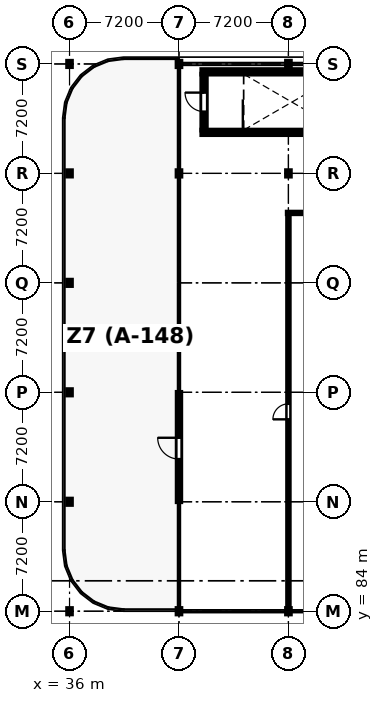
"""IFC4 building model, lengths in metres.
Left out: names, types, materials, properties, quantities, classifications, styles, units other than length and angle.
Written with IfcOpenShell. Run it as: python <this file> out.ifc"""

import sys

from ifc_helpers import new_model, si_unit, direction, frame, frame_2d, origin, origin_2d, place, context, subcontext, project, spatial, rectangle, i_section, extrude, element, fill, save


model = new_model("IFC4")
c1 = context("Model", 3, precision=1e-05, world=origin(), true_north=direction((0.0, 1.0)))
c2 = subcontext(c1, "Body", "Model", "MODEL_VIEW")
j1 = project(units=[si_unit("LENGTHUNIT", "METRE"), si_unit("PLANEANGLEUNIT", "RADIAN")], contexts=[c1])
p1 = place(None, origin())
s1 = spatial("IfcSite", under=j1, at=p1, CompositionType="ELEMENT")
p2 = place(p1, origin())
s2 = spatial("IfcBuilding", under=s1, at=p2, CompositionType="ELEMENT")
p3 = place(p2, frame((0.0, 0.0, 21.0)))
s3 = spatial("IfcBuildingStorey", under=s2, at=p3, CompositionType="ELEMENT", Elevation=21.0)
for number, where, z_axis, x_axis in (
    (1, (36.0, 84.0, 0.0), (0.0, 0.0, 1.0), (1.0, 0.0, 0.0)),
    (2, (36.0, 91.2, 0.0), (0.0, 0.0, 1.0), (1.0, 0.0, 0.0)),
    (3, (36.0, 98.4, 0.0), (0.0, 0.0, 1.0), (1.0, 0.0, 0.0)),
    (4, (36.0, 105.6, 0.0), (0.0, 0.0, 1.0), (1.0, 0.0, 0.0)),
    (5, (36.0, 112.8, 0.0), (0.0, 0.0, 1.0), (1.0, 0.0, 0.0)),
    (6, (36.0, 120.0, 0.0), (0.0, 0.0, 1.0), (1.0, 0.0, 0.0)),
):
    element("IfcColumn", number, at=place(p3, frame(where, z_axis=z_axis, x_axis=x_axis)), inside=s3, PredefinedType="COLUMN", context=c2, shape_type="SweptSolid", body=[
        extrude(i_section(OverallWidth=0.254, OverallDepth=0.356, WebThickness=0.01, FlangeThickness=0.018, FilletRadius=0.015, at=origin_2d()), origin(), (0.0, 0.0, 1.0), 3.3),
    ])
for number, where, z_axis, x_axis in (
    (7, (43.2, 84.0, 0.0), (0.0, 0.0, 1.0), (1.0, 0.0, 0.0)),
    (8, (43.2, 112.8, 0.0), (0.0, 0.0, 1.0), (1.0, 0.0, 0.0)),
):
    element("IfcColumn", number, at=place(p3, frame(where, z_axis=z_axis, x_axis=x_axis)), inside=s3, PredefinedType="COLUMN", context=c2, shape_type="SweptSolid", body=[
        extrude(i_section(OverallWidth=0.257, OverallDepth=0.363, WebThickness=0.013, FlangeThickness=0.022, FilletRadius=0.015, at=origin_2d()), origin(), (0.0, 0.0, 1.0), 3.3),
    ])
p4 = place(p3, frame((43.2, 120.0, 0.0), z_axis=(0.0, 0.0, 1.0), x_axis=(1.0, 0.0, 0.0)))
e9 = element("IfcColumn", 9, at=p4, inside=s3, PredefinedType="COLUMN", context=c2, shape_type="SweptSolid", body=[
    extrude(i_section(OverallWidth=0.257, OverallDepth=0.363, WebThickness=0.013, FlangeThickness=0.022, FilletRadius=0.015, at=origin_2d()), origin(), (0.0, 0.0, 1.0), 4.8),
])
for number, where, z_axis, x_axis in (
    (10, (50.4, 84.0, 0.0), (0.0, 0.0, 1.0), (1.0, 0.0, 0.0)),
    (11, (50.4, 112.8, 0.0), (0.0, 0.0, 1.0), (1.0, 0.0, 0.0)),
):
    element("IfcColumn", number, at=place(p3, frame(where, z_axis=z_axis, x_axis=x_axis)), inside=s3, PredefinedType="COLUMN", context=c2, shape_type="SweptSolid", body=[
        extrude(i_section(OverallWidth=0.257, OverallDepth=0.363, WebThickness=0.013, FlangeThickness=0.022, FilletRadius=0.015, at=origin_2d()), origin(), (0.0, 0.0, 1.0), 3.3),
    ])
p5 = place(p3, frame((50.4, 120.0, 0.0), z_axis=(0.0, 0.0, 1.0), x_axis=(1.0, 0.0, 0.0)))
e12 = element("IfcColumn", 12, at=p5, inside=s3, PredefinedType="COLUMN", context=c2, shape_type="SweptSolid", body=[
    extrude(i_section(OverallWidth=0.257, OverallDepth=0.363, WebThickness=0.013, FlangeThickness=0.022, FilletRadius=0.015, at=origin_2d()), origin(), (0.0, 0.0, 1.0), 4.8),
])
p6 = place(p3, frame((43.2, 91.202, 0.0), z_axis=(0.0, 0.0, 1.0), x_axis=(0.0, 1.0, 0.0)))
e13 = element("IfcWall", 13, at=p6, inside=s3, PredefinedType="STANDARD", context=c2, shape_type="SweptSolid", body=[
    extrude(rectangle(XDim=7.196, YDim=0.24, at=frame_2d((3.598, 0.0))), origin(), (0.0, 0.0, 1.0), 2.5),
])
p7 = place(p6, frame((2.808, 0.0, 0.0)))
e14 = element("IfcOpeningElement", 14, at=p7, cuts=e13, PredefinedType="OPENING", context=c2, shape_type="SweptSolid", body=[
    extrude(rectangle(XDim=1.4, YDim=2.15, at=frame_2d((0.7, 1.075))), frame((0.0, 0.13, 0.0), z_axis=(0.0, -1.0, 0.0), x_axis=(1.0, 0.0, 0.0)), (0.0, 0.0, 1.0), 0.26),
])
for number, where, z_axis, x_axis in (
    (15, (54.1, 115.5, 0.0), (0.0, 0.0, 1.0), (-1.0, 0.0, 0.0)),
    (16, (44.7, 119.48, 0.0), (0.0, 0.0, 1.0), (1.0, 0.0, 0.0)),
):
    element("IfcWall", number, at=place(p3, frame(where, z_axis=z_axis, x_axis=x_axis)), inside=s3, PredefinedType="SOLIDWALL", context=c2, shape_type="SweptSolid", body=[
        extrude(rectangle(XDim=9.4, YDim=0.3, at=frame_2d((4.7, 0.0))), origin(), (0.0, 0.0, 1.0), 2.6),
    ])
p8 = place(p3, frame((44.85, 115.65, 0.0), z_axis=(0.0, 0.0, 1.0), x_axis=(0.0, 1.0, 0.0)))
e17 = element("IfcWall", 17, at=p8, inside=s3, PredefinedType="SOLIDWALL", context=c2, shape_type="SweptSolid", body=[
    extrude(rectangle(XDim=3.68, YDim=0.3, at=frame_2d((1.84, 0.0))), origin(), (0.0, 0.0, 1.0), 2.6),
])
p9 = place(p8, frame((1.215, 0.0, 0.0)))
e18 = element("IfcOpeningElement", 18, at=p9, cuts=e17, PredefinedType="OPENING", context=c2, shape_type="SweptSolid", body=[
    extrude(rectangle(XDim=1.25, YDim=2.2, at=frame_2d((0.625, 1.1))), frame((0.0, 0.16, 0.0), z_axis=(0.0, -1.0, 0.0), x_axis=(1.0, 0.0, 0.0)), (0.0, 0.0, 1.0), 0.32),
])
p10 = place(p3, frame((50.32, 110.2, 0.0), z_axis=(0.0, 0.0, 1.0), x_axis=(1.0, 0.0, 0.0)))
e19 = element("IfcWall", 19, at=p10, inside=s3, PredefinedType="PARTITIONING", context=c2, shape_type="SweptSolid", body=[
    extrude(rectangle(XDim=57.76, YDim=0.11, at=frame_2d((28.88, 0.0))), origin(), (0.0, 0.0, 1.0), 2.5),
])
p11 = place(p3, frame((50.4, 84.122, 0.0), z_axis=(0.0, 0.0, 1.0), x_axis=(0.0, 1.0, 0.0)))
e20 = element("IfcWall", 20, at=p11, inside=s3, PredefinedType="PARTITIONING", context=c2, shape_type="SweptSolid", body=[
    extrude(rectangle(XDim=26.021, YDim=0.115, at=frame_2d((13.01, 0.0))), origin(), (0.0, 0.0, 1.0), 2.5),
])
p12 = place(p11, frame((12.5, 0.0, 0.0)))
e21 = element("IfcOpeningElement", 21, at=p12, cuts=e20, PredefinedType="OPENING", context=c2, shape_type="SweptSolid", body=[
    extrude(rectangle(XDim=1.02, YDim=2.16, at=frame_2d((0.51, 1.08))), frame((0.0, 0.067, 0.0), z_axis=(0.0, -1.0, 0.0), x_axis=(1.0, 0.0, 0.0)), (0.0, 0.0, 1.0), 0.135),
])
p13 = place(p11, frame((14.77, 0.0, 0.95)))
e22 = element("IfcOpeningElement", 22, at=p13, cuts=e20, PredefinedType="OPENING", context=c2, shape_type="SweptSolid", body=[
    extrude(rectangle(XDim=1.5, YDim=1.15, at=frame_2d((0.75, 0.575))), frame((0.0, 0.067, 0.0), z_axis=(0.0, -1.0, 0.0), x_axis=(1.0, 0.0, 0.0)), (0.0, 0.0, 1.0), 0.135),
])
p14 = place(p7, origin())
e23 = element("IfcDoor", 23, at=p14, inside=s3, OperationType="SINGLE_SWING_RIGHT", PredefinedType="DOOR", context=c2, shape_type="SweptSolid", body=[
    extrude(rectangle(XDim=1.4, YDim=2.15, at=frame_2d((0.7, 1.075))), frame((0.0, 0.025, 0.0), z_axis=(0.0, -1.0, 0.0), x_axis=(1.0, 0.0, 0.0)), (0.0, 0.0, 1.0), 0.05),
])
fill(e14, e23)
p15 = place(p9, origin())
e24 = element("IfcDoor", 24, at=p15, inside=s3, OperationType="SINGLE_SWING_RIGHT", PredefinedType="DOOR", context=c2, shape_type="SweptSolid", body=[
    extrude(rectangle(XDim=1.25, YDim=2.2, at=frame_2d((0.625, 1.1))), frame((0.0, 0.025, 0.0), z_axis=(0.0, -1.0, 0.0), x_axis=(1.0, 0.0, 0.0)), (0.0, 0.0, 1.0), 0.05),
])
fill(e18, e24)
p16 = place(p12, origin())
e25 = element("IfcDoor", 25, at=p16, inside=s3, OperationType="SINGLE_SWING_LEFT", PredefinedType="DOOR", context=c2, shape_type="SweptSolid", body=[
    extrude(rectangle(XDim=1.02, YDim=2.16, at=frame_2d((0.51, 1.08))), frame((0.0, 0.025, 0.0), z_axis=(0.0, -1.0, 0.0), x_axis=(1.0, 0.0, 0.0)), (0.0, 0.0, 1.0), 0.05),
])
fill(e21, e25)
p17 = place(p13, origin())
e26 = element("IfcWindow", 26, at=p17, inside=s3, PartitioningType="SINGLE_PANEL", PredefinedType="WINDOW", context=c2, shape_type="SweptSolid", body=[
    extrude(rectangle(XDim=1.5, YDim=1.15, at=frame_2d((0.75, 0.575))), frame((0.0, 0.03, 0.0), z_axis=(0.0, -1.0, 0.0), x_axis=(1.0, 0.0, 0.0)), (0.0, 0.0, 1.0), 0.06),
])
fill(e22, e26)
save(model, sys.argv[1])
